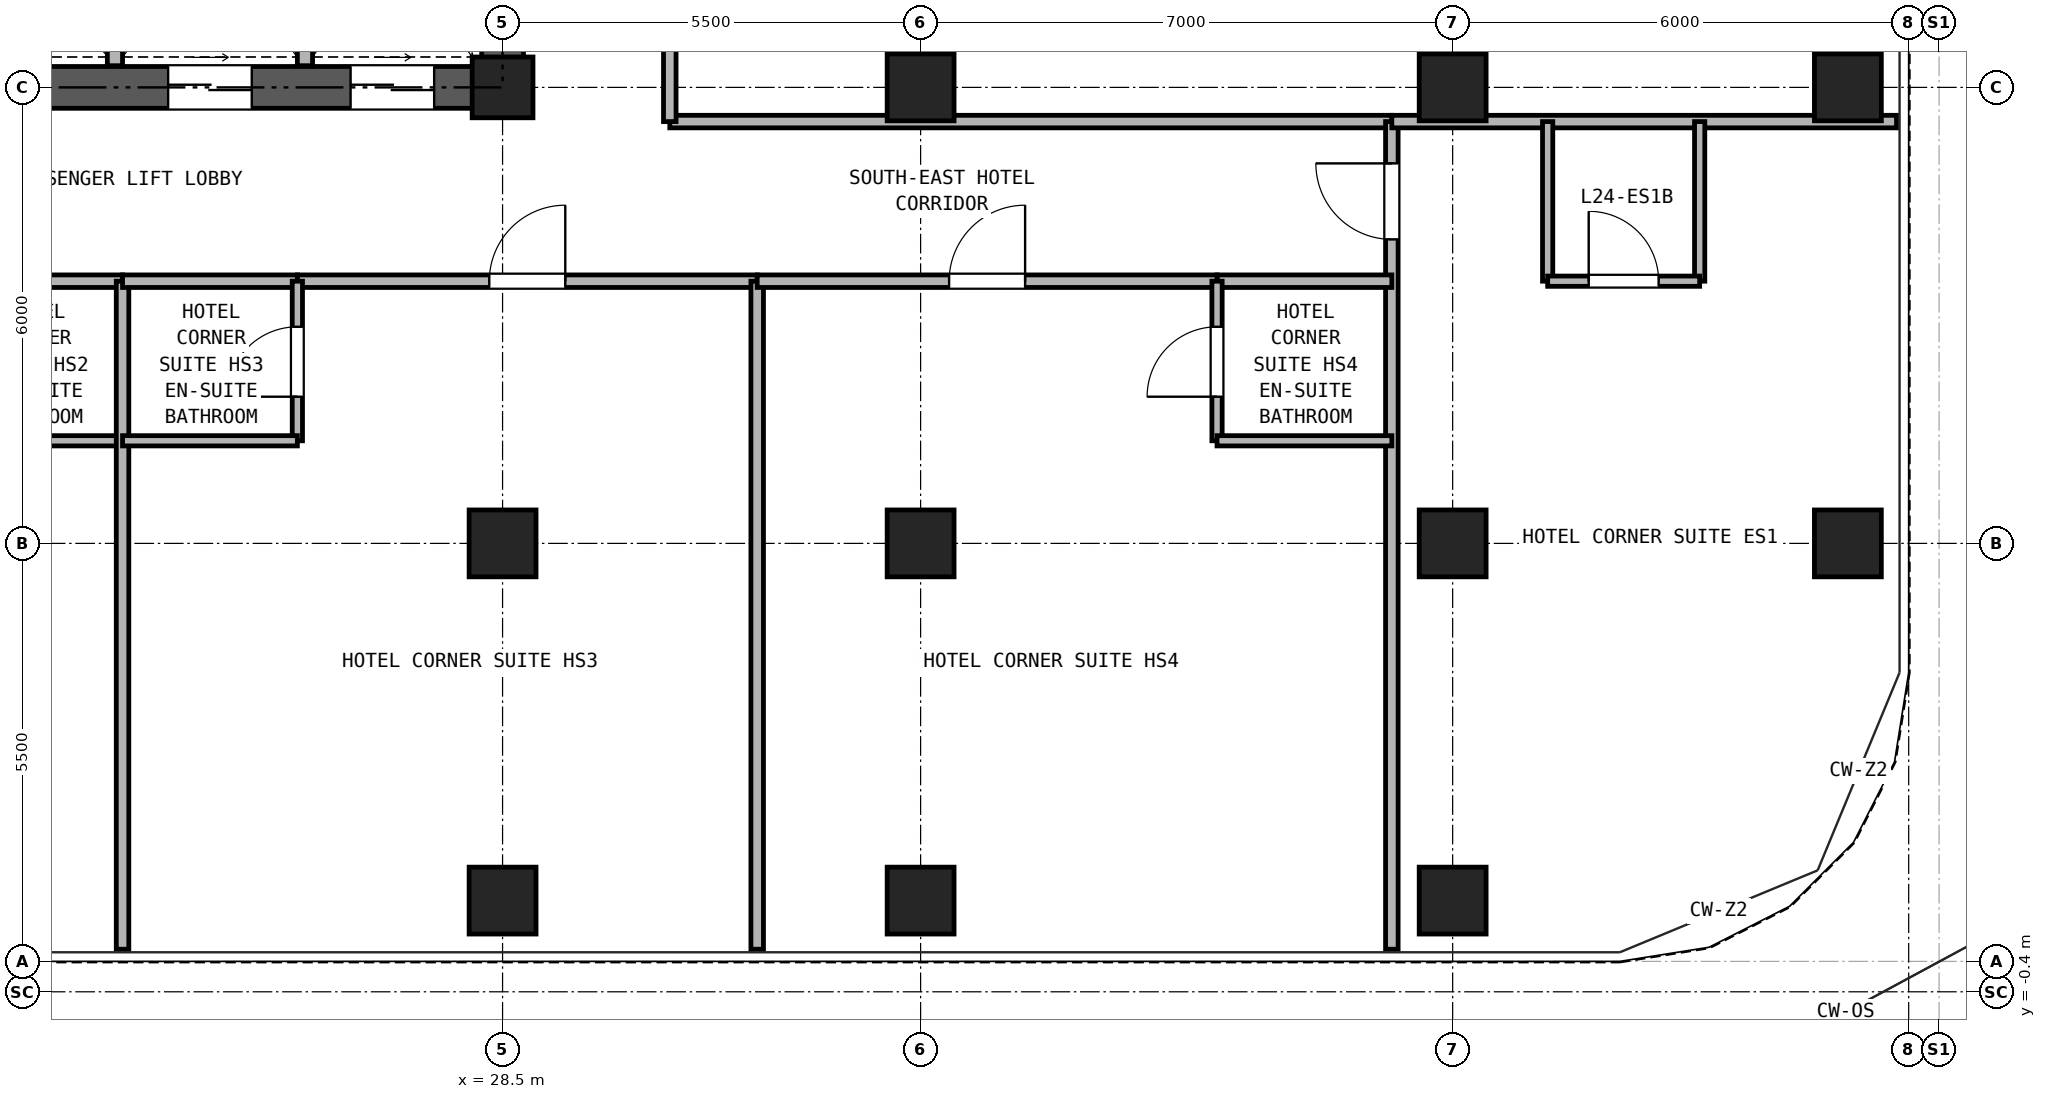
"""IFC4 building model, lengths in metres.
Left out: names, types, materials, properties, quantities, classifications, styles, units other than length and angle.
Written with IfcOpenShell. Run it as: python <this file> out.ifc"""

import sys

from ifc_helpers import new_model, si_unit, direction, frame, frame_2d, origin, origin_2d, place, context, subcontext, project, spatial, rectangle, hollow_rectangle, extrude, source, transform, mapped, element, fill, save


model = new_model("IFC4")
c1 = context("Model", 3, precision=1e-05, world=origin(), true_north=direction((0.0, 1.0)))
c2 = subcontext(c1, "Body", "Model", "MODEL_VIEW")
j1 = project(units=[si_unit("LENGTHUNIT", "METRE"), si_unit("PLANEANGLEUNIT", "RADIAN")], contexts=[c1])
p1 = place(None, origin())
s1 = spatial("IfcSite", under=j1, at=p1, CompositionType="ELEMENT")
p2 = place(p1, origin())
s2 = spatial("IfcBuilding", under=s1, at=p2, CompositionType="ELEMENT")
p3 = place(p2, frame((0.0, 0.0, 92.7)))
s3 = spatial("IfcBuildingStorey", under=s2, at=p3, CompositionType="ELEMENT", Elevation=92.7)
m1 = source(origin(), c2, "Body", "SweptSolid", [
    extrude(hollow_rectangle(XDim=0.88, YDim=0.88, WallThickness=0.05, at=origin_2d()), origin(), (0.0, 0.0, 1.0), 2.95),
])
for number, where, z_axis, x_axis in (
    (1, (28.5, 0.8, 0.0), (0.0, 0.0, 1.0), (1.0, 0.0, 0.0)),
    (2, (34.0, 0.8, 0.0), (0.0, 0.0, 1.0), (1.0, 0.0, 0.0)),
    (3, (41.0, 0.8, 0.0), (0.0, 0.0, 1.0), (1.0, 0.0, 0.0)),
    (4, (46.2, 5.5, 0.0), (0.0, 0.0, 1.0), (1.0, 0.0, 0.0)),
    (5, (46.2, 11.5, 0.0), (0.0, 0.0, 1.0), (1.0, 0.0, 0.0)),
    (6, (28.5, 5.5, 0.0), (0.0, 0.0, 1.0), (1.0, 0.0, 0.0)),
):
    element("IfcColumn", number, at=place(p3, frame(where, z_axis=z_axis, x_axis=x_axis)), inside=s3, PredefinedType="COLUMN", context=c2, shape_type="MappedRepresentation", body=[
        mapped(m1, transform((0.0, 0.0, 0.0), x_axis=(1.0, 0.0, 0.0), y_axis=(0.0, 1.0, 0.0), z_axis=(0.0, 0.0, 1.0), scale=1.0)),
    ])
m2 = source(origin(), c2, "Body", "SweptSolid", [
    extrude(hollow_rectangle(XDim=0.8, YDim=0.8, WallThickness=0.045, at=origin_2d()), origin(), (0.0, 0.0, 1.0), 2.95),
])
p4 = place(p3, frame((28.5, 11.5, 0.0), z_axis=(0.0, 0.0, 1.0), x_axis=(1.0, 0.0, 0.0)))
e7 = element("IfcColumn", 7, at=p4, inside=s3, PredefinedType="COLUMN", context=c2, shape_type="MappedRepresentation", body=[
    mapped(m2, transform((0.0, 0.0, 0.0), x_axis=(1.0, 0.0, 0.0), y_axis=(0.0, 1.0, 0.0), z_axis=(0.0, 0.0, 1.0), scale=1.0)),
])
for number, where, z_axis, x_axis in (
    (8, (34.0, 5.5, 0.0), (0.0, 0.0, 1.0), (1.0, 0.0, 0.0)),
    (9, (34.0, 11.5, 0.0), (0.0, 0.0, 1.0), (1.0, 0.0, 0.0)),
    (10, (41.0, 5.5, 0.0), (0.0, 0.0, 1.0), (1.0, 0.0, 0.0)),
    (11, (41.0, 11.5, 0.0), (0.0, 0.0, 1.0), (1.0, 0.0, 0.0)),
):
    element("IfcColumn", number, at=place(p3, frame(where, z_axis=z_axis, x_axis=x_axis)), inside=s3, PredefinedType="COLUMN", context=c2, shape_type="MappedRepresentation", body=[
        mapped(m1, transform((0.0, 0.0, 0.0), x_axis=(1.0, 0.0, 0.0), y_axis=(0.0, 1.0, 0.0), z_axis=(0.0, 0.0, 1.0), scale=1.0)),
    ])
p5 = place(p3, frame((18.225, 11.5, 0.0), z_axis=(0.0, 0.0, 1.0), x_axis=(1.0, 0.0, 0.0)))
e12 = element("IfcWall", 12, at=p5, inside=s3, PredefinedType="SHEAR", context=c2, shape_type="SweptSolid", body=[
    extrude(rectangle(XDim=10.55, YDim=0.55, at=frame_2d((5.275, 0.0))), origin(), (0.0, 0.0, 1.0), 2.95),
])
p6 = place(p5, frame((5.875, 0.0, 0.0)))
e13 = element("IfcOpeningElement", 13, at=p6, cuts=e12, PredefinedType="OPENING", context=c2, shape_type="SweptSolid", body=[
    extrude(rectangle(XDim=1.1, YDim=2.25, at=frame_2d((0.55, 1.125))), frame((0.0, 0.285, 0.0), z_axis=(0.0, -1.0, 0.0), x_axis=(1.0, 0.0, 0.0)), (0.0, 0.0, 1.0), 0.57),
])
p7 = place(p5, frame((8.275, 0.0, 0.0)))
e14 = element("IfcOpeningElement", 14, at=p7, cuts=e12, PredefinedType="OPENING", context=c2, shape_type="SweptSolid", body=[
    extrude(rectangle(XDim=1.1, YDim=2.25, at=frame_2d((0.55, 1.125))), frame((0.0, 0.285, 0.0), z_axis=(0.0, -1.0, 0.0), x_axis=(1.0, 0.0, 0.0)), (0.0, 0.0, 1.0), 0.57),
])
p8 = place(p3, frame((28.5, 11.775, 0.0), z_axis=(0.0, 0.0, 1.0), x_axis=(0.0, 1.0, 0.0)))
e15 = element("IfcWall", 15, at=p8, inside=s3, PredefinedType="SHEAR", context=c2, shape_type="SweptSolid", body=[
    extrude(rectangle(XDim=16.7, YDim=0.55, at=frame_2d((8.35, 0.0))), origin(), (0.0, 0.0, 1.0), 2.95),
])
p9 = place(p8, frame((7.375, 0.0, 0.0)))
e16 = element("IfcOpeningElement", 16, at=p9, cuts=e15, PredefinedType="OPENING", context=c2, shape_type="SweptSolid", body=[
    extrude(rectangle(XDim=1.15, YDim=2.2, at=frame_2d((0.575, 1.1))), frame((0.0, 0.285, 0.0), z_axis=(0.0, -1.0, 0.0), x_axis=(1.0, 0.0, 0.0)), (0.0, 0.0, 1.0), 0.57),
])
for number, where, z_axis, x_axis in (
    (17, (23.4, 11.785, 0.0), (0.0, 0.0, 1.0), (0.0, 1.0, 0.0)),
    (18, (25.9, 11.785, 0.0), (0.0, 0.0, 1.0), (0.0, 1.0, 0.0)),
):
    element("IfcWall", number, at=place(p3, frame(where, z_axis=z_axis, x_axis=x_axis)), inside=s3, PredefinedType="PARTITIONING", context=c2, shape_type="SweptSolid", body=[
        extrude(rectangle(XDim=3.215, YDim=0.2, at=frame_2d((1.607, 0.0))), origin(), (0.0, 0.0, 1.0), 2.95),
    ])
p10 = place(p3, frame((30.7, 11.05, 0.0), z_axis=(0.0, 0.0, 1.0), x_axis=(1.0, 0.0, 0.0)))
e19 = element("IfcWall", 19, at=p10, inside=s3, PredefinedType="PARTITIONING", context=c2, shape_type="SweptSolid", body=[
    extrude(rectangle(XDim=9.5, YDim=0.165, at=frame_2d((4.75, 0.0))), origin(), (0.0, 0.0, 1.0), 2.95),
])
p11 = place(p3, frame((30.7, 11.05, 0.0), z_axis=(0.0, 0.0, 1.0), x_axis=(0.0, 1.0, 0.0)))
e20 = element("IfcWall", 20, at=p11, inside=s3, PredefinedType="PARTITIONING", context=c2, shape_type="SweptSolid", body=[
    extrude(rectangle(XDim=18.25, YDim=0.165, at=frame_2d((9.125, 0.0))), origin(), (0.0, 0.0, 1.0), 2.95),
])
p12 = place(p11, frame((8.625, 0.0, 0.0)))
e21 = element("IfcOpeningElement", 21, at=p12, cuts=e20, PredefinedType="OPENING", context=c2, shape_type="SweptSolid", body=[
    extrude(rectangle(XDim=0.95, YDim=2.15, at=frame_2d((0.475, 1.075))), frame((0.0, 0.093, 0.0), z_axis=(0.0, -1.0, 0.0), x_axis=(1.0, 0.0, 0.0)), (0.0, 0.0, 1.0), 0.185),
])
p13 = place(p3, frame((40.2, 0.16, 0.0), z_axis=(0.0, 0.0, 1.0), x_axis=(0.0, 1.0, 0.0)))
e22 = element("IfcWall", 22, at=p13, inside=s3, PredefinedType="PARTITIONING", context=c2, shape_type="SweptSolid", body=[
    extrude(rectangle(XDim=10.89, YDim=0.165, at=frame_2d((5.445, 0.0))), origin(), (0.0, 0.0, 1.0), 2.95),
])
p14 = place(p13, frame((9.34, 0.0, 0.0)))
e23 = element("IfcOpeningElement", 23, at=p14, cuts=e22, PredefinedType="OPENING", context=c2, shape_type="SweptSolid", body=[
    extrude(rectangle(XDim=1.0, YDim=2.15, at=frame_2d((0.5, 1.075))), frame((0.0, 0.093, 0.0), z_axis=(0.0, -1.0, 0.0), x_axis=(1.0, 0.0, 0.0)), (0.0, 0.0, 1.0), 0.185),
])
p15 = place(p3, frame((40.2, 11.05, 0.0), z_axis=(0.0, 0.0, 1.0), x_axis=(1.0, 0.0, 0.0)))
e24 = element("IfcWall", 24, at=p15, inside=s3, PredefinedType="PARTITIONING", context=c2, shape_type="SweptSolid", body=[
    extrude(rectangle(XDim=6.64, YDim=0.165, at=frame_2d((3.32, 0.0))), origin(), (0.0, 0.0, 1.0), 2.95),
])
for number, where, z_axis, x_axis in (
    (25, (42.25, 8.95, 0.0), (0.0, 0.0, 1.0), (0.0, 1.0, 0.0)),
    (26, (44.25, 8.95, 0.0), (0.0, 0.0, 1.0), (0.0, 1.0, 0.0)),
):
    element("IfcWall", number, at=place(p3, frame(where, z_axis=z_axis, x_axis=x_axis)), inside=s3, PredefinedType="PARTITIONING", context=c2, shape_type="SweptSolid", body=[
        extrude(rectangle(XDim=2.1, YDim=0.135, at=frame_2d((1.05, 0.0))), origin(), (0.0, 0.0, 1.0), 2.95),
    ])
p16 = place(p3, frame((42.25, 8.95, 0.0), z_axis=(0.0, 0.0, 1.0), x_axis=(1.0, 0.0, 0.0)))
e27 = element("IfcWall", 27, at=p16, inside=s3, PredefinedType="PARTITIONING", context=c2, shape_type="SweptSolid", body=[
    extrude(rectangle(XDim=2.0, YDim=0.135, at=frame_2d((1.0, 0.0))), origin(), (0.0, 0.0, 1.0), 2.95),
])
p17 = place(p16, frame((0.54, 0.0, 0.0)))
e28 = element("IfcOpeningElement", 28, at=p17, cuts=e27, PredefinedType="OPENING", context=c2, shape_type="SweptSolid", body=[
    extrude(rectangle(XDim=0.92, YDim=2.1, at=frame_2d((0.46, 1.05))), frame((0.0, 0.077, 0.0), z_axis=(0.0, -1.0, 0.0), x_axis=(1.0, 0.0, 0.0)), (0.0, 0.0, 1.0), 0.155),
])
p18 = place(p3, frame((21.2, 8.95, 0.0), z_axis=(0.0, 0.0, 1.0), x_axis=(1.0, 0.0, 0.0)))
e29 = element("IfcWall", 29, at=p18, inside=s3, PredefinedType="PARTITIONING", context=c2, shape_type="SweptSolid", body=[
    extrude(rectangle(XDim=2.3, YDim=0.165, at=frame_2d((1.15, 0.0))), origin(), (0.0, 0.0, 1.0), 2.95),
])
p19 = place(p3, frame((21.2, 6.85, 0.0), z_axis=(0.0, 0.0, 1.0), x_axis=(1.0, 0.0, 0.0)))
e30 = element("IfcWall", 30, at=p19, inside=s3, PredefinedType="PARTITIONING", context=c2, shape_type="SweptSolid", body=[
    extrude(rectangle(XDim=2.3, YDim=0.135, at=frame_2d((1.15, 0.0))), origin(), (0.0, 0.0, 1.0), 2.95),
])
p20 = place(p3, frame((23.5, 0.16, 0.0), z_axis=(0.0, 0.0, 1.0), x_axis=(0.0, 1.0, 0.0)))
e31 = element("IfcWall", 31, at=p20, inside=s3, PredefinedType="PARTITIONING", context=c2, shape_type="SweptSolid", body=[
    extrude(rectangle(XDim=8.79, YDim=0.165, at=frame_2d((4.395, 0.0))), origin(), (0.0, 0.0, 1.0), 2.95),
])
p21 = place(p3, frame((23.5, 8.95, 0.0), z_axis=(0.0, 0.0, 1.0), x_axis=(1.0, 0.0, 0.0)))
e32 = element("IfcWall", 32, at=p21, inside=s3, PredefinedType="PARTITIONING", context=c2, shape_type="SweptSolid", body=[
    extrude(rectangle(XDim=2.3, YDim=0.165, at=frame_2d((1.15, 0.0))), origin(), (0.0, 0.0, 1.0), 2.95),
])
p22 = place(p3, frame((25.8, 8.95, 0.0), z_axis=(0.0, 0.0, 1.0), x_axis=(1.0, 0.0, 0.0)))
e33 = element("IfcWall", 33, at=p22, inside=s3, PredefinedType="PARTITIONING", context=c2, shape_type="SweptSolid", body=[
    extrude(rectangle(XDim=6.05, YDim=0.165, at=frame_2d((3.025, 0.0))), origin(), (0.0, 0.0, 1.0), 2.95),
])
p23 = place(p22, frame((2.525, 0.0, 0.0)))
e34 = element("IfcOpeningElement", 34, at=p23, cuts=e33, PredefinedType="OPENING", context=c2, shape_type="SweptSolid", body=[
    extrude(rectangle(XDim=1.0, YDim=2.15, at=frame_2d((0.5, 1.075))), frame((0.0, 0.093, 0.0), z_axis=(0.0, -1.0, 0.0), x_axis=(1.0, 0.0, 0.0)), (0.0, 0.0, 1.0), 0.185),
])
p24 = place(p3, frame((25.8, 6.85, 0.0), z_axis=(0.0, 0.0, 1.0), x_axis=(0.0, 1.0, 0.0)))
e35 = element("IfcWall", 35, at=p24, inside=s3, PredefinedType="PARTITIONING", context=c2, shape_type="SweptSolid", body=[
    extrude(rectangle(XDim=2.1, YDim=0.135, at=frame_2d((1.05, 0.0))), origin(), (0.0, 0.0, 1.0), 2.95),
])
p25 = place(p24, frame((0.58, 0.0, 0.0)))
e36 = element("IfcOpeningElement", 36, at=p25, cuts=e35, PredefinedType="OPENING", context=c2, shape_type="SweptSolid", body=[
    extrude(rectangle(XDim=0.92, YDim=2.1, at=frame_2d((0.46, 1.05))), frame((0.0, 0.077, 0.0), z_axis=(0.0, -1.0, 0.0), x_axis=(1.0, 0.0, 0.0)), (0.0, 0.0, 1.0), 0.155),
])
p26 = place(p3, frame((23.5, 6.85, 0.0), z_axis=(0.0, 0.0, 1.0), x_axis=(1.0, 0.0, 0.0)))
e37 = element("IfcWall", 37, at=p26, inside=s3, PredefinedType="PARTITIONING", context=c2, shape_type="SweptSolid", body=[
    extrude(rectangle(XDim=2.3, YDim=0.135, at=frame_2d((1.15, 0.0))), origin(), (0.0, 0.0, 1.0), 2.95),
])
p27 = place(p3, frame((31.85, 0.16, 0.0), z_axis=(0.0, 0.0, 1.0), x_axis=(0.0, 1.0, 0.0)))
e38 = element("IfcWall", 38, at=p27, inside=s3, PredefinedType="PARTITIONING", context=c2, shape_type="SweptSolid", body=[
    extrude(rectangle(XDim=8.79, YDim=0.165, at=frame_2d((4.395, 0.0))), origin(), (0.0, 0.0, 1.0), 2.95),
])
p28 = place(p3, frame((37.9, 8.95, 0.0), z_axis=(0.0, 0.0, 1.0), x_axis=(1.0, 0.0, 0.0)))
e39 = element("IfcWall", 39, at=p28, inside=s3, PredefinedType="PARTITIONING", context=c2, shape_type="SweptSolid", body=[
    extrude(rectangle(XDim=2.3, YDim=0.165, at=frame_2d((1.15, 0.0))), origin(), (0.0, 0.0, 1.0), 2.95),
])
p29 = place(p3, frame((31.85, 8.95, 0.0), z_axis=(0.0, 0.0, 1.0), x_axis=(1.0, 0.0, 0.0)))
e40 = element("IfcWall", 40, at=p29, inside=s3, PredefinedType="PARTITIONING", context=c2, shape_type="SweptSolid", body=[
    extrude(rectangle(XDim=6.05, YDim=0.165, at=frame_2d((3.025, 0.0))), origin(), (0.0, 0.0, 1.0), 2.95),
])
p30 = place(p29, frame((2.525, 0.0, 0.0)))
e41 = element("IfcOpeningElement", 41, at=p30, cuts=e40, PredefinedType="OPENING", context=c2, shape_type="SweptSolid", body=[
    extrude(rectangle(XDim=1.0, YDim=2.15, at=frame_2d((0.5, 1.075))), frame((0.0, 0.093, 0.0), z_axis=(0.0, -1.0, 0.0), x_axis=(1.0, 0.0, 0.0)), (0.0, 0.0, 1.0), 0.185),
])
p31 = place(p3, frame((37.9, 6.85, 0.0), z_axis=(0.0, 0.0, 1.0), x_axis=(0.0, 1.0, 0.0)))
e42 = element("IfcWall", 42, at=p31, inside=s3, PredefinedType="PARTITIONING", context=c2, shape_type="SweptSolid", body=[
    extrude(rectangle(XDim=2.1, YDim=0.135, at=frame_2d((1.05, 0.0))), origin(), (0.0, 0.0, 1.0), 2.95),
])
p32 = place(p31, frame((0.58, 0.0, 0.0)))
e43 = element("IfcOpeningElement", 43, at=p32, cuts=e42, PredefinedType="OPENING", context=c2, shape_type="SweptSolid", body=[
    extrude(rectangle(XDim=0.92, YDim=2.1, at=frame_2d((0.46, 1.05))), frame((0.0, 0.077, 0.0), z_axis=(0.0, -1.0, 0.0), x_axis=(1.0, 0.0, 0.0)), (0.0, 0.0, 1.0), 0.155),
])
p33 = place(p3, frame((37.9, 6.85, 0.0), z_axis=(0.0, 0.0, 1.0), x_axis=(1.0, 0.0, 0.0)))
e44 = element("IfcWall", 44, at=p33, inside=s3, PredefinedType="PARTITIONING", context=c2, shape_type="SweptSolid", body=[
    extrude(rectangle(XDim=2.3, YDim=0.135, at=frame_2d((1.15, 0.0))), origin(), (0.0, 0.0, 1.0), 2.95),
])
p34 = place(p6, frame((1.1, 0.0, 0.0), z_axis=(0.0, 0.0, 1.0), x_axis=(-1.0, 0.0, 0.0)))
e45 = element("IfcDoor", 45, at=p34, inside=s3, OperationType="DOUBLE_DOOR_SLIDING", PredefinedType="DOOR", context=c2, shape_type="SweptSolid", body=[
    extrude(rectangle(XDim=1.1, YDim=2.25, at=frame_2d((0.55, 1.125))), frame((0.0, 0.025, 0.0), z_axis=(0.0, -1.0, 0.0), x_axis=(1.0, 0.0, 0.0)), (0.0, 0.0, 1.0), 0.05),
])
fill(e13, e45)
p35 = place(p7, frame((1.1, 0.0, 0.0), z_axis=(0.0, 0.0, 1.0), x_axis=(-1.0, 0.0, 0.0)))
e46 = element("IfcDoor", 46, at=p35, inside=s3, OperationType="DOUBLE_DOOR_SLIDING", PredefinedType="DOOR", context=c2, shape_type="SweptSolid", body=[
    extrude(rectangle(XDim=1.1, YDim=2.25, at=frame_2d((0.55, 1.125))), frame((0.0, 0.025, 0.0), z_axis=(0.0, -1.0, 0.0), x_axis=(1.0, 0.0, 0.0)), (0.0, 0.0, 1.0), 0.05),
])
fill(e14, e46)
p36 = place(p17, origin())
e47 = element("IfcDoor", 47, at=p36, inside=s3, OperationType="SINGLE_SWING_LEFT", PredefinedType="DOOR", context=c2, shape_type="SweptSolid", body=[
    extrude(rectangle(XDim=0.92, YDim=2.1, at=frame_2d((0.46, 1.05))), frame((0.0, 0.025, 0.0), z_axis=(0.0, -1.0, 0.0), x_axis=(1.0, 0.0, 0.0)), (0.0, 0.0, 1.0), 0.05),
])
fill(e28, e47)
p37 = place(p14, frame((1.0, 0.0, 0.0), z_axis=(0.0, 0.0, 1.0), x_axis=(-1.0, 0.0, 0.0)))
e48 = element("IfcDoor", 48, at=p37, inside=s3, OperationType="SINGLE_SWING_RIGHT", PredefinedType="DOOR", context=c2, shape_type="SweptSolid", body=[
    extrude(rectangle(XDim=1.0, YDim=2.15, at=frame_2d((0.5, 1.075))), frame((0.0, 0.025, 0.0), z_axis=(0.0, -1.0, 0.0), x_axis=(1.0, 0.0, 0.0)), (0.0, 0.0, 1.0), 0.05),
])
fill(e23, e48)
p38 = place(p25, frame((0.92, 0.0, 0.0), z_axis=(0.0, 0.0, 1.0), x_axis=(-1.0, 0.0, 0.0)))
e49 = element("IfcDoor", 49, at=p38, inside=s3, OperationType="SINGLE_SWING_LEFT", PredefinedType="DOOR", context=c2, shape_type="SweptSolid", body=[
    extrude(rectangle(XDim=0.92, YDim=2.1, at=frame_2d((0.46, 1.05))), frame((0.0, 0.025, 0.0), z_axis=(0.0, -1.0, 0.0), x_axis=(1.0, 0.0, 0.0)), (0.0, 0.0, 1.0), 0.05),
])
fill(e36, e49)
p39 = place(p23, frame((1.0, 0.0, 0.0), z_axis=(0.0, 0.0, 1.0), x_axis=(-1.0, 0.0, 0.0)))
e50 = element("IfcDoor", 50, at=p39, inside=s3, OperationType="SINGLE_SWING_RIGHT", PredefinedType="DOOR", context=c2, shape_type="SweptSolid", body=[
    extrude(rectangle(XDim=1.0, YDim=2.15, at=frame_2d((0.5, 1.075))), frame((0.0, 0.025, 0.0), z_axis=(0.0, -1.0, 0.0), x_axis=(1.0, 0.0, 0.0)), (0.0, 0.0, 1.0), 0.05),
])
fill(e34, e50)
p40 = place(p32, origin())
e51 = element("IfcDoor", 51, at=p40, inside=s3, OperationType="SINGLE_SWING_LEFT", PredefinedType="DOOR", context=c2, shape_type="SweptSolid", body=[
    extrude(rectangle(XDim=0.92, YDim=2.1, at=frame_2d((0.46, 1.05))), frame((0.0, 0.025, 0.0), z_axis=(0.0, -1.0, 0.0), x_axis=(1.0, 0.0, 0.0)), (0.0, 0.0, 1.0), 0.05),
])
fill(e43, e51)
p41 = place(p30, frame((1.0, 0.0, 0.0), z_axis=(0.0, 0.0, 1.0), x_axis=(-1.0, 0.0, 0.0)))
e52 = element("IfcDoor", 52, at=p41, inside=s3, OperationType="SINGLE_SWING_RIGHT", PredefinedType="DOOR", context=c2, shape_type="SweptSolid", body=[
    extrude(rectangle(XDim=1.0, YDim=2.15, at=frame_2d((0.5, 1.075))), frame((0.0, 0.025, 0.0), z_axis=(0.0, -1.0, 0.0), x_axis=(1.0, 0.0, 0.0)), (0.0, 0.0, 1.0), 0.05),
])
fill(e41, e52)
save(model, sys.argv[1])
